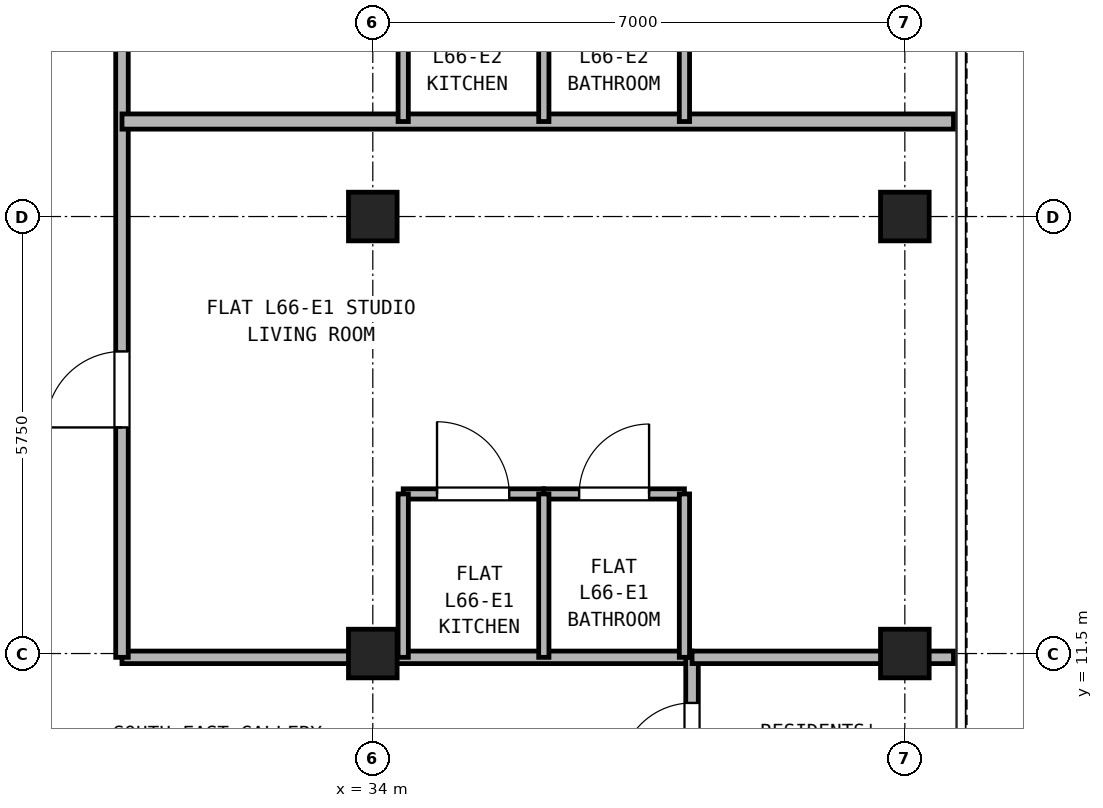
"""IFC4 building model, lengths in metres.
Left out: names, types, materials, properties, quantities, classifications, styles, units other than length and angle.
Written with IfcOpenShell. Run it as: python <this file> out.ifc"""

import sys

from ifc_helpers import new_model, si_unit, direction, frame, frame_2d, origin, origin_2d, place, context, subcontext, project, spatial, rectangle, hollow_rectangle, extrude, source, transform, mapped, element, fill, save


model = new_model("IFC4")
c1 = context("Model", 3, precision=1e-05, world=origin(), true_north=direction((0.0, 1.0)))
c2 = subcontext(c1, "Body", "Model", "MODEL_VIEW")
j1 = project(units=[si_unit("LENGTHUNIT", "METRE"), si_unit("PLANEANGLEUNIT", "RADIAN")], contexts=[c1])
p1 = place(None, origin())
s1 = spatial("IfcSite", under=j1, at=p1, CompositionType="ELEMENT")
p2 = place(p1, origin())
s2 = spatial("IfcBuilding", under=s1, at=p2, CompositionType="ELEMENT")
p3 = place(p2, frame((0.0, 0.0, 232.9)))
s3 = spatial("IfcBuildingStorey", under=s2, at=p3, CompositionType="ELEMENT", Elevation=232.9)
m1 = source(origin(), c2, "Body", "SweptSolid", [
    extrude(hollow_rectangle(XDim=0.64, YDim=0.64, WallThickness=0.035, at=origin_2d()), origin(), (0.0, 0.0, 1.0), 2.98),
])
for number, where, z_axis, x_axis in (
    (1, (41.0, 11.5, 0.0), (0.0, 0.0, 1.0), (1.0, 0.0, 0.0)),
    (2, (41.0, 17.25, 0.0), (0.0, 0.0, 1.0), (1.0, 0.0, 0.0)),
    (3, (34.0, 11.5, 0.0), (0.0, 0.0, 1.0), (1.0, 0.0, 0.0)),
    (4, (34.0, 17.25, 0.0), (0.0, 0.0, 1.0), (1.0, 0.0, 0.0)),
):
    element("IfcColumn", number, at=place(p3, frame(where, z_axis=z_axis, x_axis=x_axis)), inside=s3, PredefinedType="COLUMN", context=c2, shape_type="MappedRepresentation", body=[
        mapped(m1, transform((0.0, 0.0, 0.0), x_axis=(1.0, 0.0, 0.0), y_axis=(0.0, 1.0, 0.0), z_axis=(0.0, 0.0, 1.0), scale=1.0)),
    ])
p4 = place(p3, frame((30.7, 11.45, 0.0), z_axis=(0.0, 0.0, 1.0), x_axis=(1.0, 0.0, 0.0)))
e5 = element("IfcWall", 5, at=p4, inside=s3, PredefinedType="PARTITIONING", context=c2, shape_type="SweptSolid", body=[
    extrude(rectangle(XDim=7.5, YDim=0.165, at=frame_2d((3.75, 0.0))), origin(), (0.0, 0.0, 1.0), 2.428),
])
p5 = place(p3, frame((38.2, 9.45, 0.0), z_axis=(0.0, 0.0, 1.0), x_axis=(0.0, 1.0, 0.0)))
e6 = element("IfcWall", 6, at=p5, inside=s3, PredefinedType="PARTITIONING", context=c2, shape_type="SweptSolid", body=[
    extrude(rectangle(XDim=2.0, YDim=0.165, at=frame_2d((1.0, 0.0))), origin(), (0.0, 0.0, 1.0), 2.98),
])
p6 = place(p5, frame((0.45, 0.0, 0.0)))
e7 = element("IfcOpeningElement", 7, at=p6, cuts=e6, PredefinedType="OPENING", context=c2, shape_type="SweptSolid", body=[
    extrude(rectangle(XDim=0.95, YDim=2.15, at=frame_2d((0.475, 1.075))), frame((0.0, 0.093, 0.0), z_axis=(0.0, -1.0, 0.0), x_axis=(1.0, 0.0, 0.0)), (0.0, 0.0, 1.0), 0.185),
])
p7 = place(p3, frame((30.7, 11.45, 0.0), z_axis=(0.0, 0.0, 1.0), x_axis=(0.0, 1.0, 0.0)))
e8 = element("IfcWall", 8, at=p7, inside=s3, PredefinedType="PARTITIONING", context=c2, shape_type="SweptSolid", body=[
    extrude(rectangle(XDim=23.69, YDim=0.165, at=frame_2d((11.845, 0.0))), origin(), (0.0, 0.0, 1.0), 2.98),
])
p8 = place(p7, frame((3.025, 0.0, 0.0)))
e9 = element("IfcOpeningElement", 9, at=p8, cuts=e8, PredefinedType="OPENING", context=c2, shape_type="SweptSolid", body=[
    extrude(rectangle(XDim=1.0, YDim=2.15, at=frame_2d((0.5, 1.075))), frame((0.0, 0.093, 0.0), z_axis=(0.0, -1.0, 0.0), x_axis=(1.0, 0.0, 0.0)), (0.0, 0.0, 1.0), 0.185),
])
p9 = place(p7, frame((10.8, 0.0, 0.0)))
e10 = element("IfcOpeningElement", 10, at=p9, cuts=e8, PredefinedType="OPENING", context=c2, shape_type="SweptSolid", body=[
    extrude(rectangle(XDim=1.0, YDim=2.15, at=frame_2d((0.5, 1.075))), frame((0.0, 0.093, 0.0), z_axis=(0.0, -1.0, 0.0), x_axis=(1.0, 0.0, 0.0)), (0.0, 0.0, 1.0), 0.185),
])
p10 = place(p7, frame((16.825, 0.0, 0.0)))
e11 = element("IfcOpeningElement", 11, at=p10, cuts=e8, PredefinedType="OPENING", context=c2, shape_type="SweptSolid", body=[
    extrude(rectangle(XDim=1.0, YDim=2.15, at=frame_2d((0.5, 1.075))), frame((0.0, 0.093, 0.0), z_axis=(0.0, -1.0, 0.0), x_axis=(1.0, 0.0, 0.0)), (0.0, 0.0, 1.0), 0.185),
])
p11 = place(p3, frame((38.2, 11.45, 0.0), z_axis=(0.0, 0.0, 1.0), x_axis=(1.0, 0.0, 0.0)))
e12 = element("IfcWall", 12, at=p11, inside=s3, PredefinedType="PARTITIONING", context=c2, shape_type="SweptSolid", body=[
    extrude(rectangle(XDim=3.44, YDim=0.165, at=frame_2d((1.72, 0.0))), origin(), (0.0, 0.0, 1.0), 2.428),
])
p12 = place(p3, frame((34.4, 13.6, 0.0), z_axis=(0.0, 0.0, 1.0), x_axis=(1.0, 0.0, 0.0)))
e13 = element("IfcWall", 13, at=p12, inside=s3, PredefinedType="PARTITIONING", context=c2, shape_type="SweptSolid", body=[
    extrude(rectangle(XDim=1.85, YDim=0.135, at=frame_2d((0.925, 0.0))), origin(), (0.0, 0.0, 1.0), 2.98),
])
p13 = place(p12, frame((0.445, 0.0, 0.0)))
e14 = element("IfcOpeningElement", 14, at=p13, cuts=e13, PredefinedType="OPENING", context=c2, shape_type="SweptSolid", body=[
    extrude(rectangle(XDim=0.95, YDim=2.15, at=frame_2d((0.475, 1.075))), frame((0.0, 0.077, 0.0), z_axis=(0.0, -1.0, 0.0), x_axis=(1.0, 0.0, 0.0)), (0.0, 0.0, 1.0), 0.155),
])
p14 = place(p3, frame((36.25, 13.6, 0.0), z_axis=(0.0, 0.0, 1.0), x_axis=(1.0, 0.0, 0.0)))
e15 = element("IfcWall", 15, at=p14, inside=s3, PredefinedType="PARTITIONING", context=c2, shape_type="SweptSolid", body=[
    extrude(rectangle(XDim=1.85, YDim=0.135, at=frame_2d((0.925, 0.0))), origin(), (0.0, 0.0, 1.0), 2.98),
])
p15 = place(p14, frame((0.465, 0.0, 0.0)))
e16 = element("IfcOpeningElement", 16, at=p15, cuts=e15, PredefinedType="OPENING", context=c2, shape_type="SweptSolid", body=[
    extrude(rectangle(XDim=0.92, YDim=2.1, at=frame_2d((0.46, 1.05))), frame((0.0, 0.077, 0.0), z_axis=(0.0, -1.0, 0.0), x_axis=(1.0, 0.0, 0.0)), (0.0, 0.0, 1.0), 0.155),
])
for number, where, z_axis, x_axis in (
    (17, (34.4, 11.45, 0.0), (0.0, 0.0, 1.0), (0.0, 1.0, 0.0)),
    (18, (36.25, 11.45, 0.0), (0.0, 0.0, 1.0), (0.0, 1.0, 0.0)),
    (19, (38.1, 11.45, 0.0), (0.0, 0.0, 1.0), (0.0, 1.0, 0.0)),
):
    element("IfcWall", number, at=place(p3, frame(where, z_axis=z_axis, x_axis=x_axis)), inside=s3, PredefinedType="PARTITIONING", context=c2, shape_type="SweptSolid", body=[
        extrude(rectangle(XDim=2.15, YDim=0.135, at=frame_2d((1.075, 0.0))), origin(), (0.0, 0.0, 1.0), 2.98),
    ])
p16 = place(p3, frame((30.7, 18.5, 0.0), z_axis=(0.0, 0.0, 1.0), x_axis=(1.0, 0.0, 0.0)))
e20 = element("IfcWall", 20, at=p16, inside=s3, PredefinedType="PARTITIONING", context=c2, shape_type="SweptSolid", body=[
    extrude(rectangle(XDim=10.94, YDim=0.2, at=frame_2d((5.47, 0.0))), origin(), (0.0, 0.0, 1.0), 2.98),
])
for number, where, z_axis, x_axis in (
    (21, (34.4, 18.5, 0.0), (0.0, 0.0, 1.0), (0.0, 1.0, 0.0)),
    (22, (36.25, 18.5, 0.0), (0.0, 0.0, 1.0), (0.0, 1.0, 0.0)),
    (23, (38.1, 18.5, 0.0), (0.0, 0.0, 1.0), (0.0, 1.0, 0.0)),
):
    element("IfcWall", number, at=place(p3, frame(where, z_axis=z_axis, x_axis=x_axis)), inside=s3, PredefinedType="PARTITIONING", context=c2, shape_type="SweptSolid", body=[
        extrude(rectangle(XDim=2.15, YDim=0.135, at=frame_2d((1.075, 0.0))), origin(), (0.0, 0.0, 1.0), 2.98),
    ])
p17 = place(p6, origin())
e24 = element("IfcDoor", 24, at=p17, inside=s3, OperationType="SINGLE_SWING_LEFT", PredefinedType="DOOR", context=c2, shape_type="SweptSolid", body=[
    extrude(rectangle(XDim=0.95, YDim=2.15, at=frame_2d((0.475, 1.075))), frame((0.0, 0.025, 0.0), z_axis=(0.0, -1.0, 0.0), x_axis=(1.0, 0.0, 0.0)), (0.0, 0.0, 1.0), 0.05),
])
fill(e7, e24)
p18 = place(p13, origin())
e25 = element("IfcDoor", 25, at=p18, inside=s3, OperationType="SINGLE_SWING_LEFT", PredefinedType="DOOR", context=c2, shape_type="SweptSolid", body=[
    extrude(rectangle(XDim=0.95, YDim=2.15, at=frame_2d((0.475, 1.075))), frame((0.0, 0.025, 0.0), z_axis=(0.0, -1.0, 0.0), x_axis=(1.0, 0.0, 0.0)), (0.0, 0.0, 1.0), 0.05),
])
fill(e14, e25)
p19 = place(p15, origin())
e26 = element("IfcDoor", 26, at=p19, inside=s3, OperationType="SINGLE_SWING_RIGHT", PredefinedType="DOOR", context=c2, shape_type="SweptSolid", body=[
    extrude(rectangle(XDim=0.92, YDim=2.1, at=frame_2d((0.46, 1.05))), frame((0.0, 0.025, 0.0), z_axis=(0.0, -1.0, 0.0), x_axis=(1.0, 0.0, 0.0)), (0.0, 0.0, 1.0), 0.05),
])
fill(e16, e26)
p20 = place(p8, frame((1.0, 0.0, 0.0), z_axis=(0.0, 0.0, 1.0), x_axis=(-1.0, 0.0, 0.0)))
e27 = element("IfcDoor", 27, at=p20, inside=s3, OperationType="SINGLE_SWING_LEFT", PredefinedType="DOOR", context=c2, shape_type="SweptSolid", body=[
    extrude(rectangle(XDim=1.0, YDim=2.15, at=frame_2d((0.5, 1.075))), frame((0.0, 0.025, 0.0), z_axis=(0.0, -1.0, 0.0), x_axis=(1.0, 0.0, 0.0)), (0.0, 0.0, 1.0), 0.05),
])
fill(e9, e27)
save(model, sys.argv[1])
